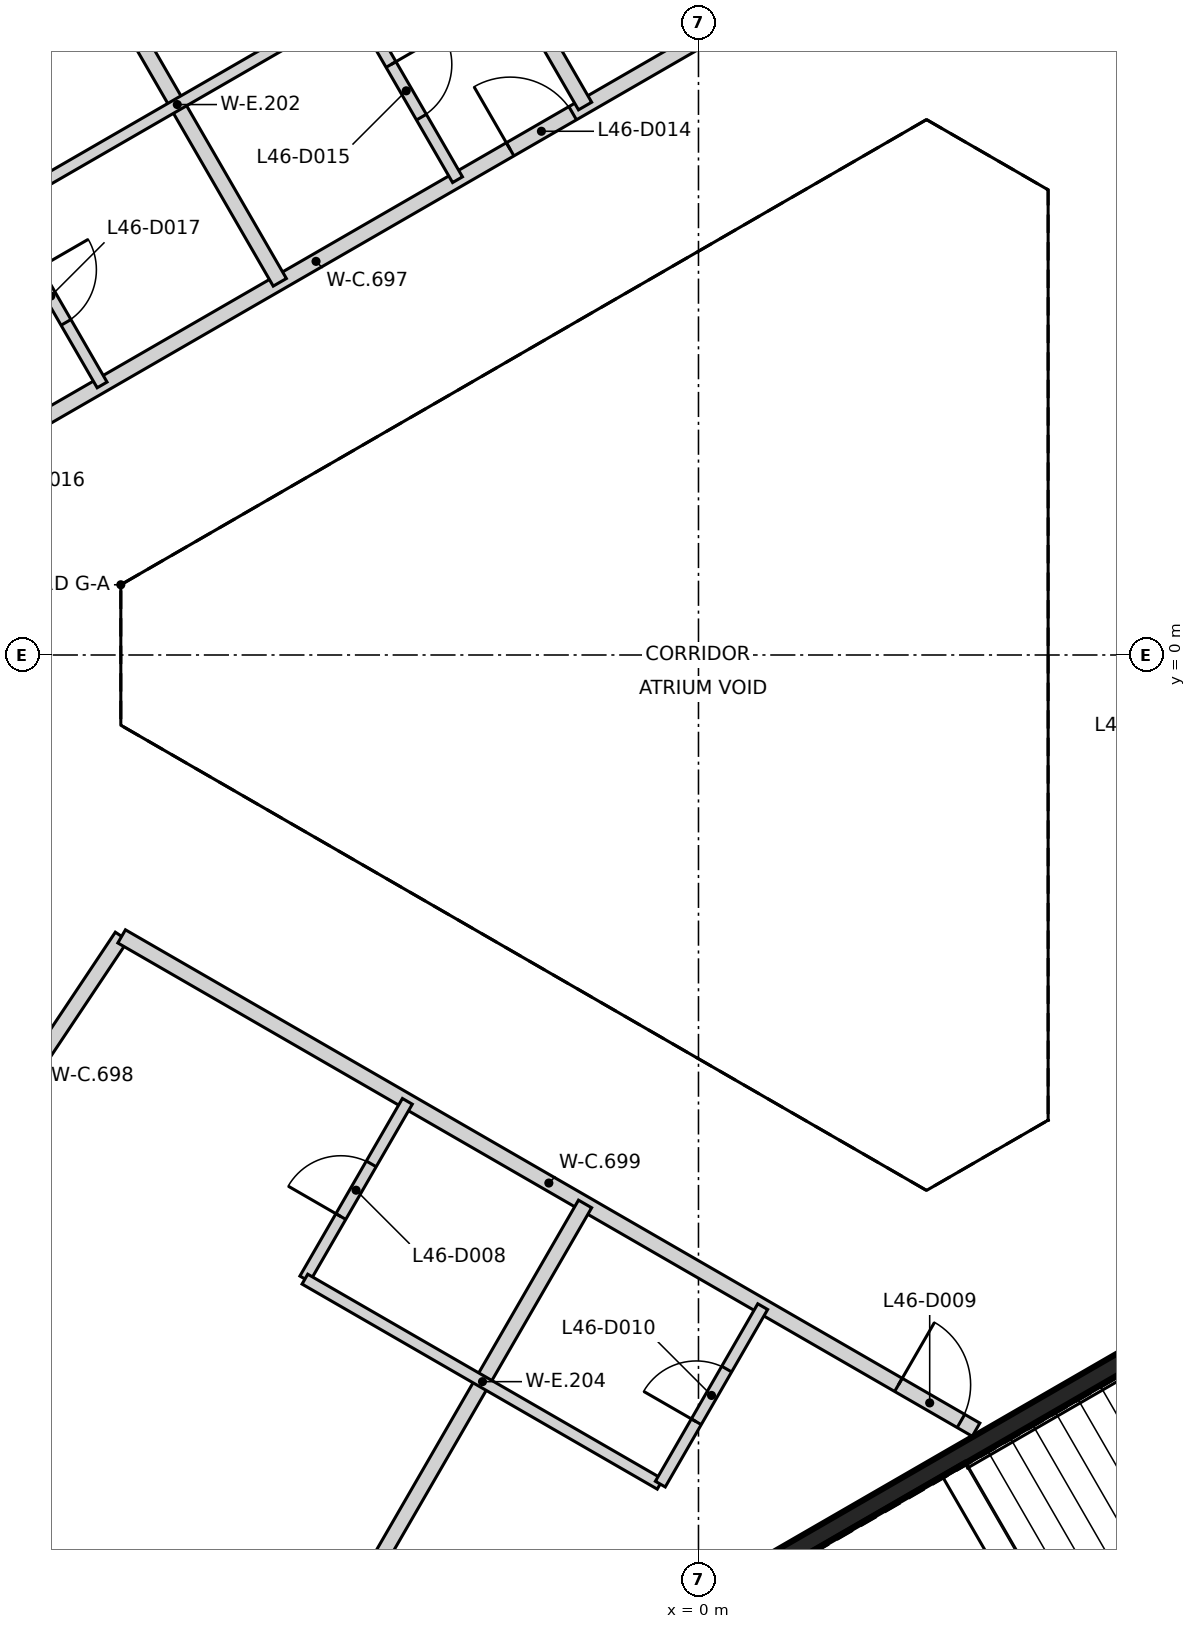
"""IFC4 building model, lengths in metres.
Left out: names, types, materials, properties, quantities, classifications, styles, units other than length and angle.
Written with IfcOpenShell. Run it as: python <this file> out.ifc"""

import sys

from ifc_helpers import new_model, si_unit, direction, frame, frame_2d, origin, place, context, subcontext, project, spatial, rectangle, extrude, element, fill, save


model = new_model("IFC4")
c1 = context("Model", 3, precision=1e-05, world=origin(), true_north=direction((0.0, 1.0)))
c2 = subcontext(c1, "Body", "Model", "MODEL_VIEW")
j1 = project(units=[si_unit("LENGTHUNIT", "METRE"), si_unit("PLANEANGLEUNIT", "RADIAN")], contexts=[c1])
p1 = place(None, origin())
s1 = spatial("IfcSite", under=j1, at=p1, CompositionType="ELEMENT")
p2 = place(p1, origin())
s2 = spatial("IfcBuilding", under=s1, at=p2, CompositionType="ELEMENT")
p3 = place(p2, frame((0.0, 0.0, 186.4)))
s3 = spatial("IfcBuildingStorey", under=s2, at=p3, CompositionType="ELEMENT", Elevation=186.4)
p4 = place(p3, frame((10.42, 6.498, 0.0), z_axis=(0.0, 0.0, 1.0), x_axis=(-0.866021906294, 0.500006057782, 0.0)))
e1 = element("IfcWall", 1, at=p4, inside=s3, PredefinedType="SHEAR", context=c2, shape_type="SweptSolid", body=[
    extrude(rectangle(XDim=11.55, YDim=0.25, at=frame_2d((5.775, 0.0))), origin(), (0.0, 0.0, 1.0), 3.25),
])
p5 = place(p4, frame((10.025, 0.0, 0.0)))
e2 = element("IfcOpeningElement", 2, at=p5, cuts=e1, PredefinedType="OPENING", context=c2, shape_type="SweptSolid", body=[
    extrude(rectangle(XDim=1.2, YDim=2.1, at=frame_2d((0.6, 1.05))), frame((0.0, 0.135, 0.0), z_axis=(0.0, -1.0, 0.0), x_axis=(1.0, 0.0, 0.0)), (0.0, 0.0, 1.0), 0.27),
])
p6 = place(p4, frame((8.725, 0.0, 0.0)))
e3 = element("IfcOpeningElement", 3, at=p6, cuts=e1, PredefinedType="OPENING", context=c2, shape_type="SweptSolid", body=[
    extrude(rectangle(XDim=1.2, YDim=2.1, at=frame_2d((0.6, 1.05))), frame((0.0, 0.135, 0.0), z_axis=(0.0, -1.0, 0.0), x_axis=(1.0, 0.0, 0.0)), (0.0, 0.0, 1.0), 0.27),
])
p7 = place(p3, frame((0.417, -12.273, 0.0), z_axis=(0.0, 0.0, 1.0), x_axis=(0.866021906294, 0.500006057782, 0.0)))
e4 = element("IfcWall", 4, at=p7, inside=s3, PredefinedType="SHEAR", context=c2, shape_type="SweptSolid", body=[
    extrude(rectangle(XDim=11.55, YDim=0.25, at=frame_2d((5.775, 0.0))), origin(), (0.0, 0.0, 1.0), 3.25),
])
p8 = place(p7, frame((10.025, 0.0, 0.0)))
e5 = element("IfcOpeningElement", 5, at=p8, cuts=e4, PredefinedType="OPENING", context=c2, shape_type="SweptSolid", body=[
    extrude(rectangle(XDim=1.2, YDim=2.1, at=frame_2d((0.6, 1.05))), frame((0.0, 0.135, 0.0), z_axis=(0.0, -1.0, 0.0), x_axis=(1.0, 0.0, 0.0)), (0.0, 0.0, 1.0), 0.27),
])
p9 = place(p7, frame((8.725, 0.0, 0.0)))
e6 = element("IfcOpeningElement", 6, at=p9, cuts=e4, PredefinedType="OPENING", context=c2, shape_type="SweptSolid", body=[
    extrude(rectangle(XDim=1.2, YDim=2.1, at=frame_2d((0.6, 1.05))), frame((0.0, 0.135, 0.0), z_axis=(0.0, -1.0, 0.0), x_axis=(1.0, 0.0, 0.0)), (0.0, 0.0, 1.0), 0.27),
])
p10 = place(p3, frame((-10.652, 1.934, 0.0), z_axis=(0.0, 0.0, 1.0), x_axis=(0.866066882415, 0.499928150021, 0.0)))
e7 = element("IfcWall", 7, at=p10, inside=s3, PredefinedType="PARTITIONING", context=c2, shape_type="SweptSolid", body=[
    extrude(rectangle(XDim=12.98, YDim=0.2, at=frame_2d((6.49, 0.0))), origin(), (0.0, 0.0, 1.0), 3.25),
])
p11 = place(p10, frame((9.439, 0.0, 0.0)))
e8 = element("IfcOpeningElement", 8, at=p11, cuts=e7, PredefinedType="OPENING", context=c2, shape_type="SweptSolid", body=[
    extrude(rectangle(XDim=0.95, YDim=2.1, at=frame_2d((0.475, 1.05))), frame((0.0, 0.11, 0.0), z_axis=(0.0, -1.0, 0.0), x_axis=(1.0, 0.0, 0.0)), (0.0, 0.0, 1.0), 0.22),
])
p12 = place(p10, frame((0.229, 0.0, 0.0)))
e9 = element("IfcOpeningElement", 9, at=p12, cuts=e7, PredefinedType="OPENING", context=c2, shape_type="SweptSolid", body=[
    extrude(rectangle(XDim=0.95, YDim=2.1, at=frame_2d((0.475, 1.05))), frame((0.0, 0.11, 0.0), z_axis=(0.0, -1.0, 0.0), x_axis=(1.0, 0.0, 0.0)), (0.0, 0.0, 1.0), 0.22),
])
p13 = place(p3, frame((-9.697, -6.864, 0.0), z_axis=(0.0, 0.0, 1.0), x_axis=(0.554670545446, 0.832070060761, 0.0)))
e10 = element("IfcWall", 10, at=p13, inside=s3, PredefinedType="PARTITIONING", context=c2, shape_type="SweptSolid", body=[
    extrude(rectangle(XDim=3.8, YDim=0.2, at=frame_2d((1.9, 0.0))), origin(), (0.0, 0.0, 1.0), 3.25),
])
p14 = place(p3, frame((-7.589, -3.702, 0.0), z_axis=(0.0, 0.0, 1.0), x_axis=(0.86602490244, -0.500000868353, 0.0)))
e11 = element("IfcWall", 11, at=p14, inside=s3, PredefinedType="PARTITIONING", context=c2, shape_type="SweptSolid", body=[
    extrude(rectangle(XDim=12.98, YDim=0.2, at=frame_2d((6.49, 0.0))), origin(), (0.0, 0.0, 1.0), 3.25),
])
p15 = place(p14, frame((11.8, 0.0, 0.0)))
e12 = element("IfcOpeningElement", 12, at=p15, cuts=e11, PredefinedType="OPENING", context=c2, shape_type="SweptSolid", body=[
    extrude(rectangle(XDim=0.95, YDim=2.1, at=frame_2d((0.475, 1.05))), frame((0.0, 0.11, 0.0), z_axis=(0.0, -1.0, 0.0), x_axis=(1.0, 0.0, 0.0)), (0.0, 0.0, 1.0), 0.22),
])
p16 = place(p3, frame((-12.067, 16.263, 0.0), z_axis=(0.0, 0.0, 1.0), x_axis=(0.500016190239, -0.866016056144, 0.0)))
e13 = element("IfcWall", 13, at=p16, inside=s3, PredefinedType="PARTITIONING", context=c2, shape_type="SweptSolid", body=[
    extrude(rectangle(XDim=13.118, YDim=0.2, at=frame_2d((6.559, 0.0))), origin(), (0.0, 0.0, 1.0), 3.25),
])
for number, where, z_axis, x_axis in (
    (14, (-8.052, 18.582, 0.0), (0.0, 0.0, 1.0), (0.5, -0.866, 0.0)),
    (15, (-8.051, -18.582, 0.0), (0.0, 0.0, 1.0), (0.5, 0.866, 0.0)),
):
    element("IfcWall", number, at=place(p3, frame(where, z_axis=z_axis, x_axis=x_axis)), inside=s3, PredefinedType="PARTITIONING", context=c2, shape_type="SweptSolid", body=[
        extrude(rectangle(XDim=13.118, YDim=0.2, at=frame_2d((6.559, 0.0))), origin(), (0.0, 0.0, 1.0), 3.25),
    ])
p17 = place(p3, frame((-9.195, 5.889, 0.0), z_axis=(0.0, 0.0, 1.0), x_axis=(0.500129820725, -0.865950438779, 0.0)))
e16 = element("IfcWall", 16, at=p17, inside=s3, PredefinedType="PARTITIONING", context=c2, shape_type="SweptSolid", body=[
    extrude(rectangle(XDim=2.698, YDim=0.15, at=frame_2d((1.349, 0.0))), origin(), (0.0, 0.0, 1.0), 3.25),
])
p18 = place(p17, frame((0.948, 0.0, 0.0)))
e17 = element("IfcOpeningElement", 17, at=p18, cuts=e16, PredefinedType="OPENING", context=c2, shape_type="SweptSolid", body=[
    extrude(rectangle(XDim=0.8, YDim=2.1, at=frame_2d((0.4, 1.05))), frame((0.0, 0.085, 0.0), z_axis=(0.0, -1.0, 0.0), x_axis=(1.0, 0.0, 0.0)), (0.0, 0.0, 1.0), 0.17),
])
p19 = place(p3, frame((-9.194, 5.892, 0.0), z_axis=(0.0, 0.0, 1.0), x_axis=(0.8659934935, 0.500055266161, 0.0)))
e18 = element("IfcWall", 18, at=p19, inside=s3, PredefinedType="PARTITIONING", context=c2, shape_type="SweptSolid", body=[
    extrude(rectangle(XDim=5.397, YDim=0.15, at=frame_2d((2.699, 0.0))), origin(), (0.0, 0.0, 1.0), 3.25),
])
p20 = place(p3, frame((-5.179, -8.208, 0.0), z_axis=(0.0, 0.0, 1.0), x_axis=(0.500061949227, 0.865989634427, 0.0)))
e19 = element("IfcWall", 19, at=p20, inside=s3, PredefinedType="PARTITIONING", context=c2, shape_type="SweptSolid", body=[
    extrude(rectangle(XDim=2.698, YDim=0.15, at=frame_2d((1.349, 0.0))), origin(), (0.0, 0.0, 1.0), 3.25),
])
p21 = place(p20, frame((0.948, 0.0, 0.0)))
e20 = element("IfcOpeningElement", 20, at=p21, cuts=e19, PredefinedType="OPENING", context=c2, shape_type="SweptSolid", body=[
    extrude(rectangle(XDim=0.8, YDim=2.1, at=frame_2d((0.4, 1.05))), frame((0.0, 0.085, 0.0), z_axis=(0.0, -1.0, 0.0), x_axis=(1.0, 0.0, 0.0)), (0.0, 0.0, 1.0), 0.17),
])
p22 = place(p3, frame((-5.178, -8.211, 0.0), z_axis=(0.0, 0.0, 1.0), x_axis=(0.866046199912, -0.49996397832, 0.0)))
e21 = element("IfcWall", 21, at=p22, inside=s3, PredefinedType="PARTITIONING", context=c2, shape_type="SweptSolid", body=[
    extrude(rectangle(XDim=5.396, YDim=0.15, at=frame_2d((2.698, 0.0))), origin(), (0.0, 0.0, 1.0), 3.25),
])
p23 = place(p3, frame((-4.52, 8.591, 0.0), z_axis=(0.0, 0.0, 1.0), x_axis=(0.500048589285, -0.86599734893, 0.0)))
e22 = element("IfcWall", 22, at=p23, inside=s3, PredefinedType="PARTITIONING", context=c2, shape_type="SweptSolid", body=[
    extrude(rectangle(XDim=2.7, YDim=0.15, at=frame_2d((1.35, 0.0))), origin(), (0.0, 0.0, 1.0), 3.25),
])
p24 = place(p23, frame((0.95, 0.0, 0.0)))
e23 = element("IfcOpeningElement", 23, at=p24, cuts=e22, PredefinedType="OPENING", context=c2, shape_type="SweptSolid", body=[
    extrude(rectangle(XDim=0.8, YDim=2.1, at=frame_2d((0.4, 1.05))), frame((0.0, 0.085, 0.0), z_axis=(0.0, -1.0, 0.0), x_axis=(1.0, 0.0, 0.0)), (0.0, 0.0, 1.0), 0.17),
])
p25 = place(p3, frame((-0.502, -10.908, 0.0), z_axis=(0.0, 0.0, 1.0), x_axis=(0.499675408556, 0.866212725654, 0.0)))
e24 = element("IfcWall", 24, at=p25, inside=s3, PredefinedType="PARTITIONING", context=c2, shape_type="SweptSolid", body=[
    extrude(rectangle(XDim=2.696, YDim=0.15, at=frame_2d((1.348, 0.0))), origin(), (0.0, 0.0, 1.0), 3.25),
])
p26 = place(p25, frame((0.948, 0.0, 0.0)))
e25 = element("IfcOpeningElement", 25, at=p26, cuts=e24, PredefinedType="OPENING", context=c2, shape_type="SweptSolid", body=[
    extrude(rectangle(XDim=0.8, YDim=2.1, at=frame_2d((0.4, 1.05))), frame((0.0, 0.085, 0.0), z_axis=(0.0, -1.0, 0.0), x_axis=(1.0, 0.0, 0.0)), (0.0, 0.0, 1.0), 0.17),
])
p27 = place(p21, origin())
e26 = element("IfcDoor", 26, at=p27, inside=s3, OperationType="SINGLE_SWING_LEFT", PredefinedType="DOOR", context=c2, shape_type="SweptSolid", body=[
    extrude(rectangle(XDim=0.8, YDim=2.1, at=frame_2d((0.4, 1.05))), frame((0.0, 0.025, 0.0), z_axis=(0.0, -1.0, 0.0), x_axis=(1.0, 0.0, 0.0)), (0.0, 0.0, 1.0), 0.05),
])
fill(e20, e26)
p28 = place(p15, frame((0.95, 0.0, 0.0), z_axis=(0.0, 0.0, 1.0), x_axis=(-1.0, 0.0, 0.0)))
e27 = element("IfcDoor", 27, at=p28, inside=s3, OperationType="SINGLE_SWING_LEFT", PredefinedType="DOOR", context=c2, shape_type="SweptSolid", body=[
    extrude(rectangle(XDim=0.95, YDim=2.1, at=frame_2d((0.475, 1.05))), frame((0.0, 0.025, 0.0), z_axis=(0.0, -1.0, 0.0), x_axis=(1.0, 0.0, 0.0)), (0.0, 0.0, 1.0), 0.05),
])
fill(e12, e27)
p29 = place(p26, frame((0.8, 0.0, 0.0), z_axis=(0.0, 0.0, 1.0), x_axis=(-1.0, 0.0, 0.0)))
e28 = element("IfcDoor", 28, at=p29, inside=s3, OperationType="SINGLE_SWING_LEFT", PredefinedType="DOOR", context=c2, shape_type="SweptSolid", body=[
    extrude(rectangle(XDim=0.8, YDim=2.1, at=frame_2d((0.4, 1.05))), frame((0.0, 0.025, 0.0), z_axis=(0.0, -1.0, 0.0), x_axis=(1.0, 0.0, 0.0)), (0.0, 0.0, 1.0), 0.05),
])
fill(e25, e28)
p30 = place(p11, origin())
e29 = element("IfcDoor", 29, at=p30, inside=s3, OperationType="SINGLE_SWING_LEFT", PredefinedType="DOOR", context=c2, shape_type="SweptSolid", body=[
    extrude(rectangle(XDim=0.95, YDim=2.1, at=frame_2d((0.475, 1.05))), frame((0.0, 0.025, 0.0), z_axis=(0.0, -1.0, 0.0), x_axis=(1.0, 0.0, 0.0)), (0.0, 0.0, 1.0), 0.05),
])
fill(e8, e29)
p31 = place(p24, frame((0.8, 0.0, 0.0), z_axis=(0.0, 0.0, 1.0), x_axis=(-1.0, 0.0, 0.0)))
e30 = element("IfcDoor", 30, at=p31, inside=s3, OperationType="SINGLE_SWING_LEFT", PredefinedType="DOOR", context=c2, shape_type="SweptSolid", body=[
    extrude(rectangle(XDim=0.8, YDim=2.1, at=frame_2d((0.4, 1.05))), frame((0.0, 0.025, 0.0), z_axis=(0.0, -1.0, 0.0), x_axis=(1.0, 0.0, 0.0)), (0.0, 0.0, 1.0), 0.05),
])
fill(e23, e30)
p32 = place(p18, frame((0.8, 0.0, 0.0), z_axis=(0.0, 0.0, 1.0), x_axis=(-1.0, 0.0, 0.0)))
e31 = element("IfcDoor", 31, at=p32, inside=s3, OperationType="SINGLE_SWING_LEFT", PredefinedType="DOOR", context=c2, shape_type="SweptSolid", body=[
    extrude(rectangle(XDim=0.8, YDim=2.1, at=frame_2d((0.4, 1.05))), frame((0.0, 0.025, 0.0), z_axis=(0.0, -1.0, 0.0), x_axis=(1.0, 0.0, 0.0)), (0.0, 0.0, 1.0), 0.05),
])
fill(e17, e31)
save(model, sys.argv[1])
